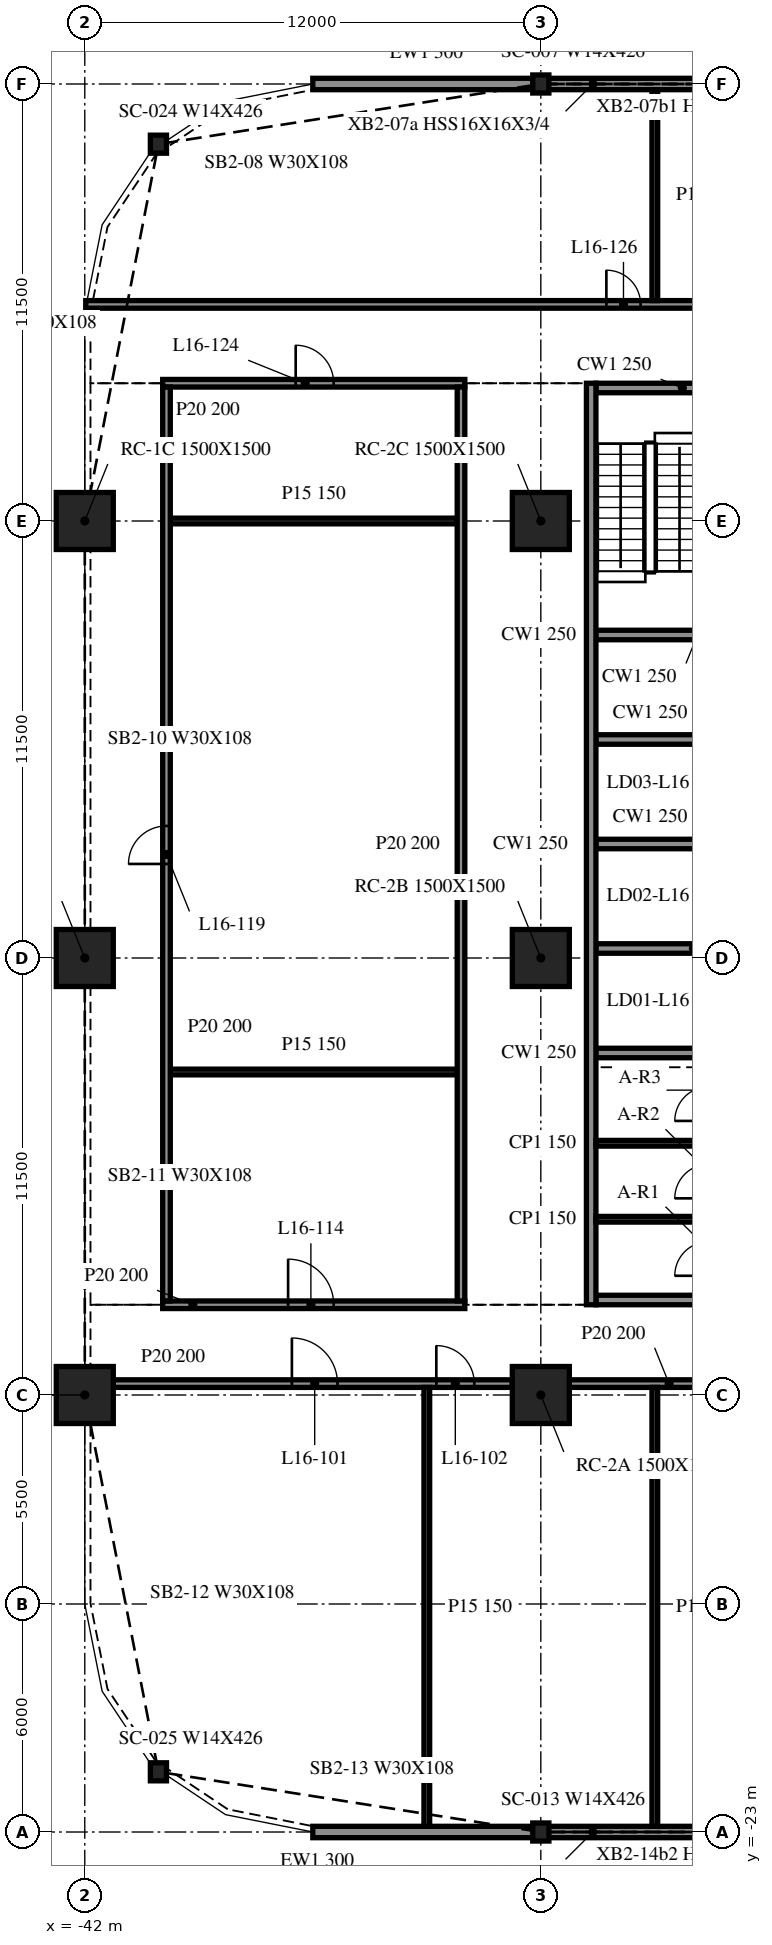
"""IFC4 building model, lengths in metres.
Left out: names, types, materials, properties, quantities, classifications, styles, units other than length and angle.
Written with IfcOpenShell. Run it as: python <this file> out.ifc"""

import sys

from ifc_helpers import new_model, si_unit, direction, frame, frame_2d, origin, origin_2d, place, context, subcontext, project, spatial, rectangle, i_section, extrude, element, fill, save


model = new_model("IFC4")
c1 = context("Model", 3, precision=1e-05, world=origin(), true_north=direction((0.0, 1.0)))
c2 = subcontext(c1, "Body", "Model", "MODEL_VIEW")
j1 = project(units=[si_unit("LENGTHUNIT", "METRE"), si_unit("PLANEANGLEUNIT", "RADIAN")], contexts=[c1])
p1 = place(None, origin())
s1 = spatial("IfcSite", under=j1, at=p1, CompositionType="ELEMENT")
p2 = place(p1, origin())
s2 = spatial("IfcBuilding", under=s1, at=p2, CompositionType="ELEMENT")
p3 = place(p2, frame((0.0, 0.0, 71.8)))
s3 = spatial("IfcBuildingStorey", under=s2, at=p3, CompositionType="ELEMENT", Elevation=71.8)
for number, where, z_axis, x_axis in (
    (1, (-42.0, -11.5, -0.34), (0.0, 0.0, 1.0), (1.0, 0.0, 0.0)),
    (2, (-42.0, 0.0, -0.34), (0.0, 0.0, 1.0), (1.0, 0.0, 0.0)),
    (3, (-42.0, 11.5, -0.34), (0.0, 0.0, 1.0), (1.0, 0.0, 0.0)),
    (4, (-30.0, -11.5, -0.34), (0.0, 0.0, 1.0), (1.0, 0.0, 0.0)),
    (5, (-30.0, 0.0, -0.34), (0.0, 0.0, 1.0), (1.0, 0.0, 0.0)),
    (6, (-30.0, 11.5, -0.34), (0.0, 0.0, 1.0), (1.0, 0.0, 0.0)),
):
    element("IfcColumn", number, at=place(p3, frame(where, z_axis=z_axis, x_axis=x_axis)), inside=s3, PredefinedType="COLUMN", context=c2, shape_type="SweptSolid", body=[
        extrude(rectangle(XDim=1.5, YDim=1.5, at=origin_2d()), origin(), (0.0, 0.0, 1.0), 4.3),
    ])
for number, where, z_axis, x_axis in (
    (7, (-30.0, 23.0, -0.34), (0.0, 0.0, 1.0), (1.0, 0.0, 0.0)),
    (8, (-40.062, 21.416, -0.34), (0.0, 0.0, 1.0), (1.0, 0.0, 0.0)),
    (9, (-40.062, -21.416, -0.34), (0.0, 0.0, 1.0), (1.0, 0.0, 0.0)),
    (10, (-30.0, -23.0, -0.34), (0.0, 0.0, 1.0), (1.0, 0.0, 0.0)),
):
    element("IfcColumn", number, at=place(p3, frame(where, z_axis=z_axis, x_axis=x_axis)), inside=s3, PredefinedType="COLUMN", context=c2, shape_type="SweptSolid", body=[
        extrude(i_section(OverallWidth=0.424, OverallDepth=0.475, WebThickness=0.048, FlangeThickness=0.077, at=origin_2d()), origin(), (0.0, 0.0, 1.0), 4.3),
    ])
p4 = place(p3, frame((-18.024, 23.0, 0.0), z_axis=(0.0, 0.0, 1.0), x_axis=(-1.0, 0.0, 0.0)))
e11 = element("IfcWall", 11, at=p4, inside=s3, PredefinedType="NOTDEFINED", context=c2, shape_type="SweptSolid", body=[
    extrude(rectangle(XDim=11.952, YDim=0.3, at=frame_2d((5.976, 0.0))), origin(), (0.0, 0.0, 1.0), 3.203),
])
for number, where, z_axis, x_axis in (
    (12, (-30.024, 23.0, 0.0), (0.0, 0.0, 1.0), (-1.0, 0.0, 0.0)),
    (13, (-36.0, -23.0, 0.0), (0.0, 0.0, 1.0), (1.0, 0.0, 0.0)),
):
    element("IfcWall", number, at=place(p3, frame(where, z_axis=z_axis, x_axis=x_axis)), inside=s3, PredefinedType="NOTDEFINED", context=c2, shape_type="SweptSolid", body=[
        extrude(rectangle(XDim=5.976, YDim=0.3, at=frame_2d((2.988, 0.0))), origin(), (0.0, 0.0, 1.0), 3.203),
    ])
p5 = place(p3, frame((-29.976, -23.0, 0.0), z_axis=(0.0, 0.0, 1.0), x_axis=(1.0, 0.0, 0.0)))
e14 = element("IfcWall", 14, at=p5, inside=s3, PredefinedType="NOTDEFINED", context=c2, shape_type="SweptSolid", body=[
    extrude(rectangle(XDim=11.952, YDim=0.3, at=frame_2d((5.976, 0.0))), origin(), (0.0, 0.0, 1.0), 3.203),
])
p6 = place(p3, frame((-28.675, 15.125, 0.0), z_axis=(0.0, 0.0, 1.0), x_axis=(0.0, -1.0, 0.0)))
e15 = element("IfcWall", 15, at=p6, inside=s3, PredefinedType="SOLIDWALL", context=c2, shape_type="SweptSolid", body=[
    extrude(rectangle(XDim=24.25, YDim=0.25, at=frame_2d((12.125, 0.0))), origin(), (0.0, 0.0, 1.0), 3.96),
])
p7 = place(p3, frame((-19.45, -9.0, 0.0), z_axis=(0.0, 0.0, 1.0), x_axis=(-1.0, 0.0, 0.0)))
e16 = element("IfcWall", 16, at=p7, inside=s3, PredefinedType="SOLIDWALL", context=c2, shape_type="SweptSolid", body=[
    extrude(rectangle(XDim=9.1, YDim=0.25, at=frame_2d((4.55, 0.0))), origin(), (0.0, 0.0, 1.0), 3.96),
])
p8 = place(p7, frame((3.65, 0.0, 0.0)))
e17 = element("IfcOpeningElement", 17, at=p8, cuts=e16, PredefinedType="OPENING", context=c2, shape_type="SweptSolid", body=[
    extrude(rectangle(XDim=1.8, YDim=2.1, at=frame_2d((0.9, 1.05))), frame((0.0, 0.135, 0.0), z_axis=(0.0, -1.0, 0.0), x_axis=(1.0, 0.0, 0.0)), (0.0, 0.0, 1.0), 0.27),
])
p9 = place(p3, frame((-28.55, 15.0, 0.0), z_axis=(0.0, 0.0, 1.0), x_axis=(1.0, 0.0, 0.0)))
e18 = element("IfcWall", 18, at=p9, inside=s3, PredefinedType="SOLIDWALL", context=c2, shape_type="SweptSolid", body=[
    extrude(rectangle(XDim=9.1, YDim=0.25, at=frame_2d((4.55, 0.0))), origin(), (0.0, 0.0, 1.0), 3.96),
])
p10 = place(p9, frame((3.65, 0.0, 0.0)))
e19 = element("IfcOpeningElement", 19, at=p10, cuts=e18, PredefinedType="OPENING", context=c2, shape_type="SweptSolid", body=[
    extrude(rectangle(XDim=1.8, YDim=2.1, at=frame_2d((0.9, 1.05))), frame((0.0, 0.135, 0.0), z_axis=(0.0, -1.0, 0.0), x_axis=(1.0, 0.0, 0.0)), (0.0, 0.0, 1.0), 0.27),
])
for number, where, z_axis, x_axis in (
    (20, (-28.55, -2.5, 0.0), (0.0, 0.0, 1.0), (1.0, 0.0, 0.0)),
    (21, (-28.55, 0.25, 0.0), (0.0, 0.0, 1.0), (1.0, 0.0, 0.0)),
    (22, (-28.55, 3.0, 0.0), (0.0, 0.0, 1.0), (1.0, 0.0, 0.0)),
    (23, (-28.55, 5.75, 0.0), (0.0, 0.0, 1.0), (1.0, 0.0, 0.0)),
    (24, (-28.55, 8.5, 0.0), (0.0, 0.0, 1.0), (1.0, 0.0, 0.0)),
):
    element("IfcWall", number, at=place(p3, frame(where, z_axis=z_axis, x_axis=x_axis)), inside=s3, PredefinedType="SOLIDWALL", context=c2, shape_type="SweptSolid", body=[
        extrude(rectangle(XDim=2.85, YDim=0.25, at=frame_2d((1.425, 0.0))), origin(), (0.0, 0.0, 1.0), 3.96),
    ])
for number, where, z_axis, x_axis in (
    (25, (-28.55, -6.875, 0.0), (0.0, 0.0, 1.0), (1.0, 0.0, 0.0)),
    (26, (-28.55, -4.875, 0.0), (0.0, 0.0, 1.0), (1.0, 0.0, 0.0)),
):
    element("IfcWall", number, at=place(p3, frame(where, z_axis=z_axis, x_axis=x_axis)), inside=s3, PredefinedType="PARTITIONING", context=c2, shape_type="SweptSolid", body=[
        extrude(rectangle(XDim=2.85, YDim=0.15, at=frame_2d((1.425, 0.0))), origin(), (0.0, 0.0, 1.0), 3.96),
    ])
p11 = place(p3, frame((-41.25, -11.2, 0.0), z_axis=(0.0, 0.0, 1.0), x_axis=(1.0, 0.0, 0.0)))
e27 = element("IfcWall", 27, at=p11, inside=s3, PredefinedType="PARTITIONING", context=c2, shape_type="SweptSolid", body=[
    extrude(rectangle(XDim=10.5, YDim=0.2, at=frame_2d((5.25, 0.0))), origin(), (0.0, 0.0, 1.0), 3.96),
])
p12 = place(p11, frame((4.7, 0.0, 0.0)))
e28 = element("IfcOpeningElement", 28, at=p12, cuts=e27, PredefinedType="OPENING", context=c2, shape_type="SweptSolid", body=[
    extrude(rectangle(XDim=1.2, YDim=2.1, at=frame_2d((0.6, 1.05))), frame((0.0, 0.11, 0.0), z_axis=(0.0, -1.0, 0.0), x_axis=(1.0, 0.0, 0.0)), (0.0, 0.0, 1.0), 0.22),
])
p13 = place(p11, frame((8.5, 0.0, 0.0)))
e29 = element("IfcOpeningElement", 29, at=p13, cuts=e27, PredefinedType="OPENING", context=c2, shape_type="SweptSolid", body=[
    extrude(rectangle(XDim=1.0, YDim=2.1, at=frame_2d((0.5, 1.05))), frame((0.0, 0.11, 0.0), z_axis=(0.0, -1.0, 0.0), x_axis=(1.0, 0.0, 0.0)), (0.0, 0.0, 1.0), 0.22),
])
p14 = place(p3, frame((-29.25, -11.2, 0.0), z_axis=(0.0, 0.0, 1.0), x_axis=(1.0, 0.0, 0.0)))
e30 = element("IfcWall", 30, at=p14, inside=s3, PredefinedType="PARTITIONING", context=c2, shape_type="SweptSolid", body=[
    extrude(rectangle(XDim=10.5, YDim=0.2, at=frame_2d((5.25, 0.0))), origin(), (0.0, 0.0, 1.0), 3.96),
])
p15 = place(p14, frame((4.7, 0.0, 0.0)))
e31 = element("IfcOpeningElement", 31, at=p15, cuts=e30, PredefinedType="OPENING", context=c2, shape_type="SweptSolid", body=[
    extrude(rectangle(XDim=1.2, YDim=2.1, at=frame_2d((0.6, 1.05))), frame((0.0, 0.11, 0.0), z_axis=(0.0, -1.0, 0.0), x_axis=(1.0, 0.0, 0.0)), (0.0, 0.0, 1.0), 0.22),
])
p16 = place(p3, frame((-39.95, -9.125, 0.0), z_axis=(0.0, 0.0, 1.0), x_axis=(1.0, 0.0, 0.0)))
e32 = element("IfcWall", 32, at=p16, inside=s3, PredefinedType="PARTITIONING", context=c2, shape_type="SweptSolid", body=[
    extrude(rectangle(XDim=7.95, YDim=0.2, at=frame_2d((3.975, 0.0))), origin(), (0.0, 0.0, 1.0), 3.96),
])
p17 = place(p16, frame((3.3, 0.0, 0.0)))
e33 = element("IfcOpeningElement", 33, at=p17, cuts=e32, PredefinedType="OPENING", context=c2, shape_type="SweptSolid", body=[
    extrude(rectangle(XDim=1.2, YDim=2.1, at=frame_2d((0.6, 1.05))), frame((0.0, 0.11, 0.0), z_axis=(0.0, -1.0, 0.0), x_axis=(1.0, 0.0, 0.0)), (0.0, 0.0, 1.0), 0.22),
])
for number, where, z_axis, x_axis in (
    (34, (-39.75, -3.0, 0.0), (0.0, 0.0, 1.0), (1.0, 0.0, 0.0)),
    (35, (-39.75, 11.5, 0.0), (0.0, 0.0, 1.0), (1.0, 0.0, 0.0)),
):
    element("IfcWall", number, at=place(p3, frame(where, z_axis=z_axis, x_axis=x_axis)), inside=s3, PredefinedType="PARTITIONING", context=c2, shape_type="SweptSolid", body=[
        extrude(rectangle(XDim=7.55, YDim=0.15, at=frame_2d((3.775, 0.0))), origin(), (0.0, 0.0, 1.0), 3.96),
    ])
p18 = place(p3, frame((-39.95, 15.125, 0.0), z_axis=(0.0, 0.0, 1.0), x_axis=(1.0, 0.0, 0.0)))
e36 = element("IfcWall", 36, at=p18, inside=s3, PredefinedType="PARTITIONING", context=c2, shape_type="SweptSolid", body=[
    extrude(rectangle(XDim=7.95, YDim=0.2, at=frame_2d((3.975, 0.0))), origin(), (0.0, 0.0, 1.0), 3.96),
])
p19 = place(p18, frame((3.5, 0.0, 0.0)))
e37 = element("IfcOpeningElement", 37, at=p19, cuts=e36, PredefinedType="OPENING", context=c2, shape_type="SweptSolid", body=[
    extrude(rectangle(XDim=1.0, YDim=2.1, at=frame_2d((0.5, 1.05))), frame((0.0, 0.11, 0.0), z_axis=(0.0, -1.0, 0.0), x_axis=(1.0, 0.0, 0.0)), (0.0, 0.0, 1.0), 0.22),
])
p20 = place(p3, frame((-41.975, 17.2, 0.0), z_axis=(0.0, 0.0, 1.0), x_axis=(1.0, 0.0, 0.0)))
e38 = element("IfcWall", 38, at=p20, inside=s3, PredefinedType="PARTITIONING", context=c2, shape_type="SweptSolid", body=[
    extrude(rectangle(XDim=95.782, YDim=0.2, at=frame_2d((47.891, 0.0))), origin(), (0.0, 0.0, 1.0), 3.96),
])
p21 = place(p20, frame((13.7, 0.0, 0.0)))
e39 = element("IfcOpeningElement", 39, at=p21, cuts=e38, PredefinedType="OPENING", context=c2, shape_type="SweptSolid", body=[
    extrude(rectangle(XDim=0.9, YDim=2.1, at=frame_2d((0.45, 1.05))), frame((0.0, 0.11, 0.0), z_axis=(0.0, -1.0, 0.0), x_axis=(1.0, 0.0, 0.0)), (0.0, 0.0, 1.0), 0.22),
])
p22 = place(p20, frame((19.7, 0.0, 0.0)))
e40 = element("IfcOpeningElement", 40, at=p22, cuts=e38, PredefinedType="OPENING", context=c2, shape_type="SweptSolid", body=[
    extrude(rectangle(XDim=0.9, YDim=2.1, at=frame_2d((0.45, 1.05))), frame((0.0, 0.11, 0.0), z_axis=(0.0, -1.0, 0.0), x_axis=(1.0, 0.0, 0.0)), (0.0, 0.0, 1.0), 0.22),
])
p23 = place(p20, frame((23.1, 0.0, 0.0)))
e41 = element("IfcOpeningElement", 41, at=p23, cuts=e38, PredefinedType="OPENING", context=c2, shape_type="SweptSolid", body=[
    extrude(rectangle(XDim=0.9, YDim=2.1, at=frame_2d((0.45, 1.05))), frame((0.0, 0.11, 0.0), z_axis=(0.0, -1.0, 0.0), x_axis=(1.0, 0.0, 0.0)), (0.0, 0.0, 1.0), 0.22),
])
p24 = place(p20, frame((25.7, 0.0, 0.0)))
e42 = element("IfcOpeningElement", 42, at=p24, cuts=e38, PredefinedType="OPENING", context=c2, shape_type="SweptSolid", body=[
    extrude(rectangle(XDim=0.9, YDim=2.1, at=frame_2d((0.45, 1.05))), frame((0.0, 0.11, 0.0), z_axis=(0.0, -1.0, 0.0), x_axis=(1.0, 0.0, 0.0)), (0.0, 0.0, 1.0), 0.22),
])
p25 = place(p20, frame((40.7, 0.0, 0.0)))
e43 = element("IfcOpeningElement", 43, at=p25, cuts=e38, PredefinedType="OPENING", context=c2, shape_type="SweptSolid", body=[
    extrude(rectangle(XDim=0.9, YDim=2.1, at=frame_2d((0.45, 1.05))), frame((0.0, 0.11, 0.0), z_axis=(0.0, -1.0, 0.0), x_axis=(1.0, 0.0, 0.0)), (0.0, 0.0, 1.0), 0.22),
])
p26 = place(p20, frame((46.7, 0.0, 0.0)))
e44 = element("IfcOpeningElement", 44, at=p26, cuts=e38, PredefinedType="OPENING", context=c2, shape_type="SweptSolid", body=[
    extrude(rectangle(XDim=0.9, YDim=2.1, at=frame_2d((0.45, 1.05))), frame((0.0, 0.11, 0.0), z_axis=(0.0, -1.0, 0.0), x_axis=(1.0, 0.0, 0.0)), (0.0, 0.0, 1.0), 0.22),
])
p27 = place(p20, frame((48.1, 0.0, 0.0)))
e45 = element("IfcOpeningElement", 45, at=p27, cuts=e38, PredefinedType="OPENING", context=c2, shape_type="SweptSolid", body=[
    extrude(rectangle(XDim=0.9, YDim=2.1, at=frame_2d((0.45, 1.05))), frame((0.0, 0.11, 0.0), z_axis=(0.0, -1.0, 0.0), x_axis=(1.0, 0.0, 0.0)), (0.0, 0.0, 1.0), 0.22),
])
p28 = place(p20, frame((51.5, 0.0, 0.0)))
e46 = element("IfcOpeningElement", 46, at=p28, cuts=e38, PredefinedType="OPENING", context=c2, shape_type="SweptSolid", body=[
    extrude(rectangle(XDim=0.9, YDim=2.1, at=frame_2d((0.45, 1.05))), frame((0.0, 0.11, 0.0), z_axis=(0.0, -1.0, 0.0), x_axis=(1.0, 0.0, 0.0)), (0.0, 0.0, 1.0), 0.22),
])
p29 = place(p20, frame((54.1, 0.0, 0.0)))
e47 = element("IfcOpeningElement", 47, at=p29, cuts=e38, PredefinedType="OPENING", context=c2, shape_type="SweptSolid", body=[
    extrude(rectangle(XDim=0.9, YDim=2.1, at=frame_2d((0.45, 1.05))), frame((0.0, 0.11, 0.0), z_axis=(0.0, -1.0, 0.0), x_axis=(1.0, 0.0, 0.0)), (0.0, 0.0, 1.0), 0.22),
])
p30 = place(p20, frame((69.1, 0.0, 0.0)))
e48 = element("IfcOpeningElement", 48, at=p30, cuts=e38, PredefinedType="OPENING", context=c2, shape_type="SweptSolid", body=[
    extrude(rectangle(XDim=0.9, YDim=2.1, at=frame_2d((0.45, 1.05))), frame((0.0, 0.11, 0.0), z_axis=(0.0, -1.0, 0.0), x_axis=(1.0, 0.0, 0.0)), (0.0, 0.0, 1.0), 0.22),
])
p31 = place(p20, frame((75.1, 0.0, 0.0)))
e49 = element("IfcOpeningElement", 49, at=p31, cuts=e38, PredefinedType="OPENING", context=c2, shape_type="SweptSolid", body=[
    extrude(rectangle(XDim=0.9, YDim=2.1, at=frame_2d((0.45, 1.05))), frame((0.0, 0.11, 0.0), z_axis=(0.0, -1.0, 0.0), x_axis=(1.0, 0.0, 0.0)), (0.0, 0.0, 1.0), 0.22),
])
p32 = place(p20, frame((78.1, 0.0, 0.0)))
e50 = element("IfcOpeningElement", 50, at=p32, cuts=e38, PredefinedType="OPENING", context=c2, shape_type="SweptSolid", body=[
    extrude(rectangle(XDim=0.9, YDim=2.1, at=frame_2d((0.45, 1.05))), frame((0.0, 0.11, 0.0), z_axis=(0.0, -1.0, 0.0), x_axis=(1.0, 0.0, 0.0)), (0.0, 0.0, 1.0), 0.22),
])
p33 = place(p20, frame((81.5, 0.0, 0.0)))
e51 = element("IfcOpeningElement", 51, at=p33, cuts=e38, PredefinedType="OPENING", context=c2, shape_type="SweptSolid", body=[
    extrude(rectangle(XDim=0.9, YDim=2.1, at=frame_2d((0.45, 1.05))), frame((0.0, 0.11, 0.0), z_axis=(0.0, -1.0, 0.0), x_axis=(1.0, 0.0, 0.0)), (0.0, 0.0, 1.0), 0.22),
])
p34 = place(p3, frame((-39.85, -9.025, 0.0), z_axis=(0.0, 0.0, 1.0), x_axis=(0.0, 1.0, 0.0)))
e52 = element("IfcWall", 52, at=p34, inside=s3, PredefinedType="PARTITIONING", context=c2, shape_type="SweptSolid", body=[
    extrude(rectangle(XDim=24.05, YDim=0.2, at=frame_2d((12.025, 0.0))), origin(), (0.0, 0.0, 1.0), 3.96),
])
p35 = place(p34, frame((11.5, 0.0, 0.0)))
e53 = element("IfcOpeningElement", 53, at=p35, cuts=e52, PredefinedType="OPENING", context=c2, shape_type="SweptSolid", body=[
    extrude(rectangle(XDim=1.0, YDim=2.1, at=frame_2d((0.5, 1.05))), frame((0.0, 0.11, 0.0), z_axis=(0.0, -1.0, 0.0), x_axis=(1.0, 0.0, 0.0)), (0.0, 0.0, 1.0), 0.22),
])
p36 = place(p3, frame((-33.0, -22.85, 0.0), z_axis=(0.0, 0.0, 1.0), x_axis=(0.0, 1.0, 0.0)))
e54 = element("IfcWall", 54, at=p36, inside=s3, PredefinedType="PARTITIONING", context=c2, shape_type="SweptSolid", body=[
    extrude(rectangle(XDim=11.55, YDim=0.15, at=frame_2d((5.775, 0.0))), origin(), (0.0, 0.0, 1.0), 3.96),
])
p37 = place(p3, frame((-32.1, -9.025, 0.0), z_axis=(0.0, 0.0, 1.0), x_axis=(0.0, 1.0, 0.0)))
e55 = element("IfcWall", 55, at=p37, inside=s3, PredefinedType="PARTITIONING", context=c2, shape_type="SweptSolid", body=[
    extrude(rectangle(XDim=24.05, YDim=0.2, at=frame_2d((12.025, 0.0))), origin(), (0.0, 0.0, 1.0), 3.96),
])
p38 = place(p3, frame((-27.0, -22.85, 0.0), z_axis=(0.0, 0.0, 1.0), x_axis=(0.0, 1.0, 0.0)))
e56 = element("IfcWall", 56, at=p38, inside=s3, PredefinedType="PARTITIONING", context=c2, shape_type="SweptSolid", body=[
    extrude(rectangle(XDim=11.55, YDim=0.15, at=frame_2d((5.775, 0.0))), origin(), (0.0, 0.0, 1.0), 3.96),
])
p39 = place(p3, frame((-27.0, 17.3, 0.0), z_axis=(0.0, 0.0, 1.0), x_axis=(0.0, 1.0, 0.0)))
e57 = element("IfcWall", 57, at=p39, inside=s3, PredefinedType="PARTITIONING", context=c2, shape_type="SweptSolid", body=[
    extrude(rectangle(XDim=5.55, YDim=0.15, at=frame_2d((2.775, 0.0))), origin(), (0.0, 0.0, 1.0), 3.96),
])
p40 = place(p12, origin())
e58 = element("IfcDoor", 58, at=p40, inside=s3, OperationType="SINGLE_SWING_LEFT", PredefinedType="DOOR", context=c2, shape_type="SweptSolid", body=[
    extrude(rectangle(XDim=1.2, YDim=2.1, at=frame_2d((0.6, 1.05))), frame((0.0, 0.025, 0.0), z_axis=(0.0, -1.0, 0.0), x_axis=(1.0, 0.0, 0.0)), (0.0, 0.0, 1.0), 0.05),
])
fill(e28, e58)
p41 = place(p13, origin())
e59 = element("IfcDoor", 59, at=p41, inside=s3, OperationType="SINGLE_SWING_LEFT", PredefinedType="DOOR", context=c2, shape_type="SweptSolid", body=[
    extrude(rectangle(XDim=1.0, YDim=2.1, at=frame_2d((0.5, 1.05))), frame((0.0, 0.025, 0.0), z_axis=(0.0, -1.0, 0.0), x_axis=(1.0, 0.0, 0.0)), (0.0, 0.0, 1.0), 0.05),
])
fill(e29, e59)
p42 = place(p17, origin())
e60 = element("IfcDoor", 60, at=p42, inside=s3, OperationType="SINGLE_SWING_LEFT", PredefinedType="DOOR", context=c2, shape_type="SweptSolid", body=[
    extrude(rectangle(XDim=1.2, YDim=2.1, at=frame_2d((0.6, 1.05))), frame((0.0, 0.025, 0.0), z_axis=(0.0, -1.0, 0.0), x_axis=(1.0, 0.0, 0.0)), (0.0, 0.0, 1.0), 0.05),
])
fill(e33, e60)
p43 = place(p35, origin())
e61 = element("IfcDoor", 61, at=p43, inside=s3, OperationType="SINGLE_SWING_RIGHT", PredefinedType="DOOR", context=c2, shape_type="SweptSolid", body=[
    extrude(rectangle(XDim=1.0, YDim=2.1, at=frame_2d((0.5, 1.05))), frame((0.0, 0.025, 0.0), z_axis=(0.0, -1.0, 0.0), x_axis=(1.0, 0.0, 0.0)), (0.0, 0.0, 1.0), 0.05),
])
fill(e53, e61)
p44 = place(p19, origin())
e62 = element("IfcDoor", 62, at=p44, inside=s3, OperationType="SINGLE_SWING_LEFT", PredefinedType="DOOR", context=c2, shape_type="SweptSolid", body=[
    extrude(rectangle(XDim=1.0, YDim=2.1, at=frame_2d((0.5, 1.05))), frame((0.0, 0.025, 0.0), z_axis=(0.0, -1.0, 0.0), x_axis=(1.0, 0.0, 0.0)), (0.0, 0.0, 1.0), 0.05),
])
fill(e37, e62)
p45 = place(p21, origin())
e63 = element("IfcDoor", 63, at=p45, inside=s3, OperationType="SINGLE_SWING_LEFT", PredefinedType="DOOR", context=c2, shape_type="SweptSolid", body=[
    extrude(rectangle(XDim=0.9, YDim=2.1, at=frame_2d((0.45, 1.05))), frame((0.0, 0.025, 0.0), z_axis=(0.0, -1.0, 0.0), x_axis=(1.0, 0.0, 0.0)), (0.0, 0.0, 1.0), 0.05),
])
fill(e39, e63)
save(model, sys.argv[1])
